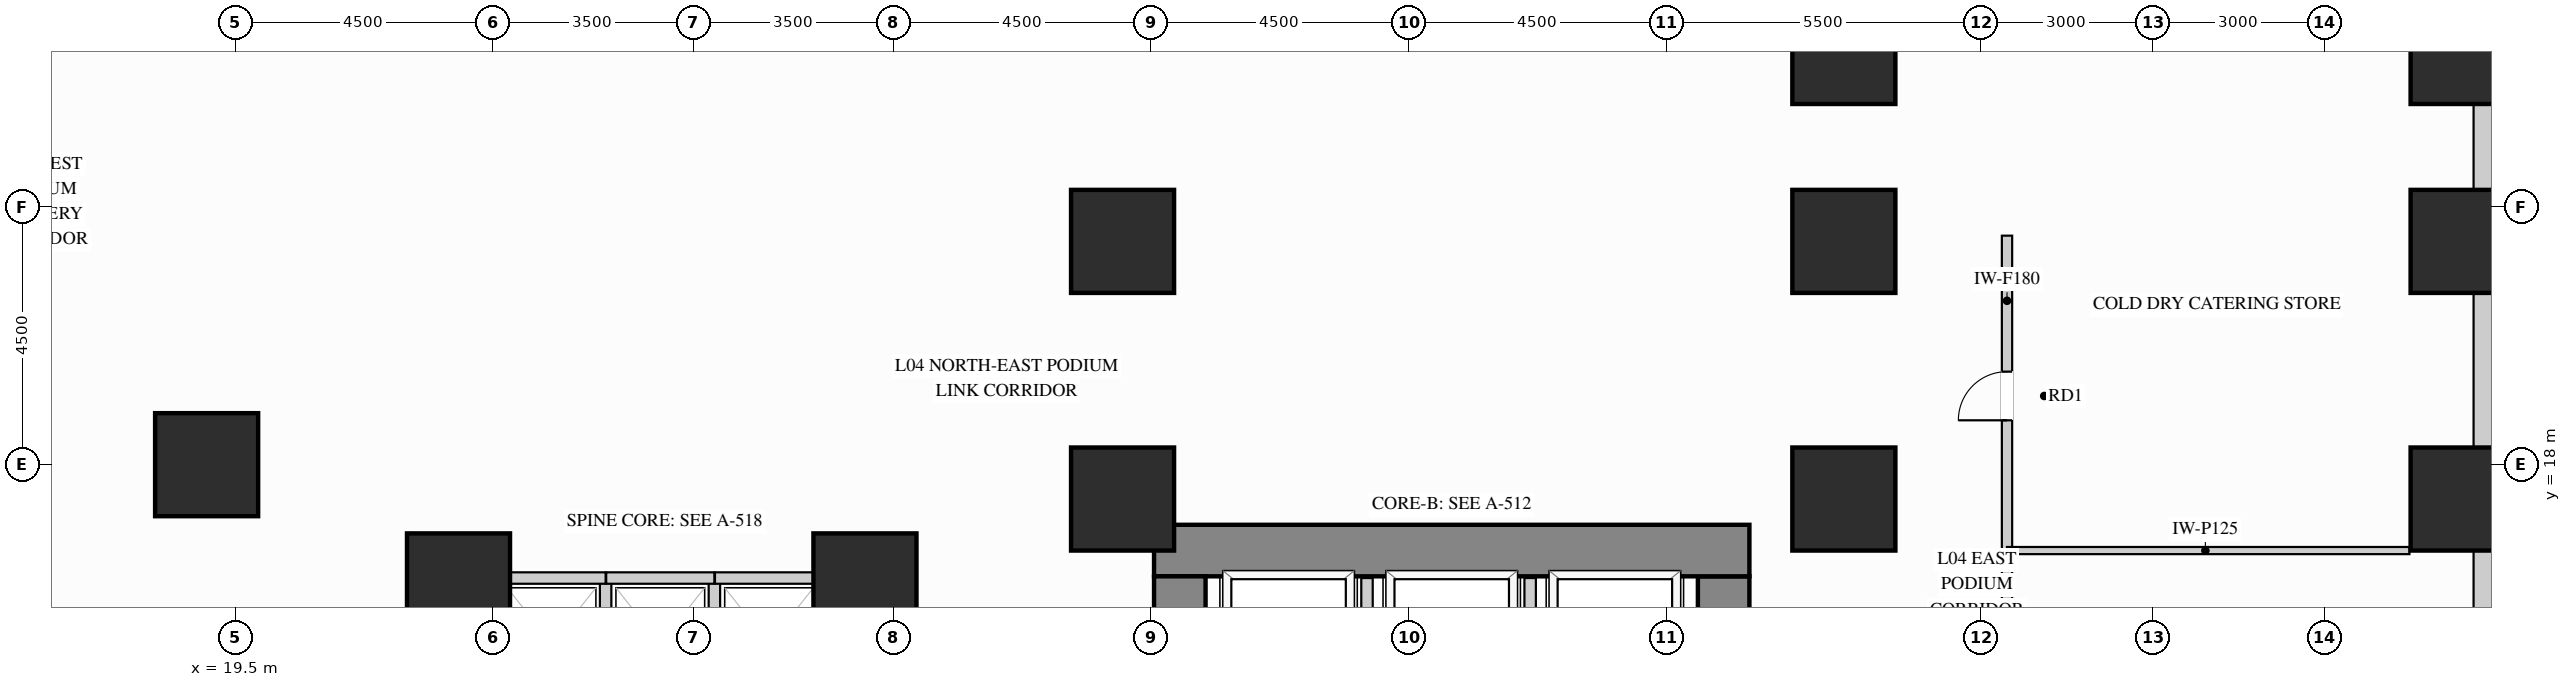
"""IFC4 building model, lengths in metres.
Left out: names, types, materials, properties, quantities, classifications, styles, units other than length and angle.
Written with IfcOpenShell. Run it as: python <this file> out.ifc"""

import sys

from ifc_helpers import new_model, si_unit, direction, frame, frame_2d, origin, origin_2d, place, context, subcontext, project, spatial, rectangle, extrude, source, transform, mapped, element, fill, save


model = new_model("IFC4")
c1 = context("Model", 3, precision=1e-05, world=origin(), true_north=direction((0.0, 1.0)))
c2 = subcontext(c1, "Body", "Model", "MODEL_VIEW")
j1 = project(units=[si_unit("LENGTHUNIT", "METRE"), si_unit("PLANEANGLEUNIT", "RADIAN")], contexts=[c1])
p1 = place(None, origin())
s1 = spatial("IfcSite", under=j1, at=p1, CompositionType="ELEMENT")
p2 = place(p1, origin())
s2 = spatial("IfcBuilding", under=s1, at=p2, CompositionType="ELEMENT")
p3 = place(p2, frame((0.0, 0.0, 18.0)))
s3 = spatial("IfcBuildingStorey", under=s2, at=p3, CompositionType="ELEMENT", Elevation=18.0)
m1 = source(origin(), c2, "Body", "SweptSolid", [
    extrude(rectangle(XDim=1.8, YDim=1.8, at=origin_2d()), origin(), (0.0, 0.0, 1.0), 4.28),
])
for number, where, z_axis, x_axis in (
    (1, (58.4, 17.4, 0.0), (0.0, 0.0, 1.0), (1.0, 0.0, 0.0)),
    (2, (58.4, 21.9, 0.0), (0.0, 0.0, 1.0), (1.0, 0.0, 0.0)),
    (3, (58.4, 25.2, 0.0), (0.0, 0.0, 1.0), (1.0, 0.0, 0.0)),
    (4, (47.6, 17.4, 0.0), (0.0, 0.0, 1.0), (1.0, 0.0, 0.0)),
    (5, (47.6, 21.9, 0.0), (0.0, 0.0, 1.0), (1.0, 0.0, 0.0)),
    (6, (47.6, 25.2, 0.0), (0.0, 0.0, 1.0), (1.0, 0.0, 0.0)),
    (7, (19.0, 18.0, 0.0), (0.0, 0.0, 1.0), (1.0, 0.0, 0.0)),
    (8, (35.0, 17.4, 0.0), (0.0, 0.0, 1.0), (1.0, 0.0, 0.0)),
    (9, (35.0, 21.9, 0.0), (0.0, 0.0, 1.0), (1.0, 0.0, 0.0)),
    (10, (23.4, 15.9, 0.0), (0.0, 0.0, 1.0), (1.0, 0.0, 0.0)),
    (11, (30.5, 15.9, 0.0), (0.0, 0.0, 1.0), (1.0, 0.0, 0.0)),
):
    element("IfcColumn", number, at=place(p3, frame(where, z_axis=z_axis, x_axis=x_axis)), inside=s3, PredefinedType="COLUMN", context=c2, shape_type="MappedRepresentation", body=[
        mapped(m1, transform((0.0, 0.0, 0.0), x_axis=(1.0, 0.0, 0.0), y_axis=(0.0, 1.0, 0.0), z_axis=(0.0, 0.0, 1.0))),
    ])
m2 = source(origin(), c2, "Body", "SweptSolid", [
    extrude(rectangle(XDim=3.65, YDim=0.9, at=frame_2d((1.825, 0.0))), origin(), (0.0, 0.0, 1.0), 4.28),
])
p4 = place(p3, frame((45.5, 12.4, 0.0), z_axis=(0.0, 0.0, 1.0), x_axis=(0.0, 1.0, 0.0)))
e12 = element("IfcWall", 12, at=p4, inside=s3, PredefinedType="SHEAR", context=c2, shape_type="MappedRepresentation", body=[
    mapped(m2, transform((0.0, 0.0, 0.0), x_axis=(1.0, 0.0, 0.0), y_axis=(0.0, 1.0, 0.0), z_axis=(0.0, 0.0, 1.0))),
])
m3 = source(origin(), c2, "Body", "SweptSolid", [
    extrude(rectangle(XDim=10.4, YDim=0.9, at=frame_2d((5.2, 0.0))), origin(), (0.0, 0.0, 1.0), 4.28),
])
p5 = place(p3, frame((35.55, 16.5, 0.0), z_axis=(0.0, 0.0, 1.0), x_axis=(1.0, 0.0, 0.0)))
e13 = element("IfcWall", 13, at=p5, inside=s3, PredefinedType="SHEAR", context=c2, shape_type="MappedRepresentation", body=[
    mapped(m3, transform((0.0, 0.0, 0.0), x_axis=(1.0, 0.0, 0.0), y_axis=(0.0, 1.0, 0.0), z_axis=(0.0, 0.0, 1.0))),
])
p6 = place(p3, frame((36.0, 12.4, 0.0), z_axis=(0.0, 0.0, 1.0), x_axis=(0.0, 1.0, 0.0)))
e14 = element("IfcWall", 14, at=p6, inside=s3, PredefinedType="SHEAR", context=c2, shape_type="MappedRepresentation", body=[
    mapped(m2, transform((0.0, 0.0, 0.0), x_axis=(1.0, 0.0, 0.0), y_axis=(0.0, 1.0, 0.0), z_axis=(0.0, 0.0, 1.0))),
])
m4 = source(origin(), c2, "Body", "SweptSolid", [
    extrude(rectangle(XDim=2.104, YDim=0.4, at=frame_2d((1.052, 0.0))), origin(), (0.0, 0.0, 1.0), 1.865),
])
p7 = place(p3, frame((58.8, 14.398, 0.0), z_axis=(0.0, 0.0, 1.0), x_axis=(0.0, 1.0, 0.0)))
e15 = element("IfcWall", 15, at=p7, inside=s3, PredefinedType="SOLIDWALL", context=c2, shape_type="MappedRepresentation", body=[
    mapped(m4, transform((0.0, 0.0, 0.0), x_axis=(1.0, 0.0, 0.0), y_axis=(0.0, 1.0, 0.0), z_axis=(0.0, 0.0, 1.0))),
])
m5 = source(origin(), c2, "Body", "SweptSolid", [
    extrude(rectangle(XDim=2.704, YDim=0.4, at=frame_2d((1.352, 0.0))), origin(), (0.0, 0.0, 1.0), 1.865),
])
p8 = place(p3, frame((58.8, 18.298, 0.0), z_axis=(0.0, 0.0, 1.0), x_axis=(0.0, 1.0, 0.0)))
e16 = element("IfcWall", 16, at=p8, inside=s3, PredefinedType="SOLIDWALL", context=c2, shape_type="MappedRepresentation", body=[
    mapped(m5, transform((0.0, 0.0, 0.0), x_axis=(1.0, 0.0, 0.0), y_axis=(0.0, 1.0, 0.0), z_axis=(0.0, 0.0, 1.0))),
])
m6 = source(origin(), c2, "Body", "SweptSolid", [
    extrude(rectangle(XDim=1.504, YDim=0.4, at=frame_2d((0.752, 0.0))), origin(), (0.0, 0.0, 1.0), 1.865),
])
p9 = place(p3, frame((58.8, 22.798, 0.0), z_axis=(0.0, 0.0, 1.0), x_axis=(0.0, 1.0, 0.0)))
e17 = element("IfcWall", 17, at=p9, inside=s3, PredefinedType="SOLIDWALL", context=c2, shape_type="MappedRepresentation", body=[
    mapped(m6, transform((0.0, 0.0, 0.0), x_axis=(1.0, 0.0, 0.0), y_axis=(0.0, 1.0, 0.0), z_axis=(0.0, 0.0, 1.0))),
])
p10 = place(p3, frame((50.45, 8.5, 0.0), z_axis=(0.0, 0.0, 1.0), x_axis=(0.0, 1.0, 0.0)))
e18 = element("IfcWall", 18, at=p10, inside=s3, PredefinedType="PARTITIONING", context=c2, shape_type="SweptSolid", body=[
    extrude(rectangle(XDim=8.0, YDim=0.18, at=frame_2d((4.0, 0.0))), origin(), (0.0, 0.0, 1.0), 4.265),
])
p11 = place(p10, frame((3.525, 0.0, 0.0)))
e19 = element("IfcOpeningElement", 19, at=p11, cuts=e18, PredefinedType="OPENING", context=c2, shape_type="SweptSolid", body=[
    extrude(rectangle(XDim=0.95, YDim=2.15, at=frame_2d((0.475, 1.075))), frame((0.0, 0.1, 0.0), z_axis=(0.0, -1.0, 0.0), x_axis=(1.0, 0.0, 0.0)), (0.0, 0.0, 1.0), 0.2),
])
p12 = place(p3, frame((50.45, 16.5, 0.0), z_axis=(0.0, 0.0, 1.0), x_axis=(0.0, 1.0, 0.0)))
e20 = element("IfcWall", 20, at=p12, inside=s3, PredefinedType="PARTITIONING", context=c2, shape_type="SweptSolid", body=[
    extrude(rectangle(XDim=5.5, YDim=0.18, at=frame_2d((2.75, 0.0))), origin(), (0.0, 0.0, 1.0), 4.265),
])
p13 = place(p12, frame((2.275, 0.0, 0.0)))
e21 = element("IfcOpeningElement", 21, at=p13, cuts=e20, PredefinedType="OPENING", context=c2, shape_type="SweptSolid", body=[
    extrude(rectangle(XDim=0.85, YDim=2.1, at=frame_2d((0.425, 1.05))), frame((0.0, 0.1, 0.0), z_axis=(0.0, -1.0, 0.0), x_axis=(1.0, 0.0, 0.0)), (0.0, 0.0, 1.0), 0.2),
])
m7 = source(origin(), c2, "Body", "SweptSolid", [
    extrude(rectangle(XDim=7.03, YDim=0.125, at=frame_2d((3.515, 0.0))), origin(), (0.0, 0.0, 1.0), 4.265),
])
p14 = place(p3, frame((50.45, 16.5, 0.0), z_axis=(0.0, 0.0, 1.0), x_axis=(1.0, 0.0, 0.0)))
e22 = element("IfcWall", 22, at=p14, inside=s3, PredefinedType="PARTITIONING", context=c2, shape_type="MappedRepresentation", body=[
    mapped(m7, transform((0.0, 0.0, 0.0), x_axis=(1.0, 0.0, 0.0), y_axis=(0.0, 1.0, 0.0), z_axis=(0.0, 0.0, 1.0))),
])
m8 = source(origin(), c2, "Body", "SweptSolid", [
    extrude(rectangle(XDim=1.89, YDim=0.2, at=frame_2d((0.945, 0.0))), origin(), (0.0, 0.0, 1.0), 4.265),
])
for number, where, z_axis, x_axis in (
    (23, (39.27, 14.13, 0.0), (0.0, 0.0, 1.0), (0.0, 1.0, 0.0)),
    (24, (42.12, 14.13, 0.0), (0.0, 0.0, 1.0), (0.0, 1.0, 0.0)),
):
    element("IfcWall", number, at=place(p3, frame(where, z_axis=z_axis, x_axis=x_axis)), inside=s3, PredefinedType="PARTITIONING", context=c2, shape_type="MappedRepresentation", body=[
        mapped(m8, transform((0.0, 0.0, 0.0), x_axis=(1.0, 0.0, 0.0), y_axis=(0.0, 1.0, 0.0), z_axis=(0.0, 0.0, 1.0))),
    ])
m9 = source(origin(), c2, "Body", "SweptSolid", [
    extrude(rectangle(XDim=2.29, YDim=0.2, at=frame_2d((1.145, 0.0))), origin(), (0.0, 0.0, 1.0), 4.265),
])
p15 = place(p3, frame((25.97, 13.73, 0.0), z_axis=(0.0, 0.0, 1.0), x_axis=(0.0, 1.0, 0.0)))
e25 = element("IfcWall", 25, at=p15, inside=s3, PredefinedType="PARTITIONING", context=c2, shape_type="MappedRepresentation", body=[
    mapped(m9, transform((0.0, 0.0, 0.0), x_axis=(1.0, 0.0, 0.0), y_axis=(0.0, 1.0, 0.0), z_axis=(0.0, 0.0, 1.0))),
])
m10 = source(origin(), c2, "Body", "SweptSolid", [
    extrude(rectangle(XDim=1.89, YDim=0.2, at=frame_2d((0.945, 0.0))), origin(), (0.0, 0.0, 1.0), 4.265),
])
p16 = place(p3, frame((24.08, 16.02, 0.0), z_axis=(0.0, 0.0, 1.0), x_axis=(1.0, 0.0, 0.0)))
e26 = element("IfcWall", 26, at=p16, inside=s3, PredefinedType="PARTITIONING", context=c2, shape_type="MappedRepresentation", body=[
    mapped(m10, transform((0.0, 0.0, 0.0), x_axis=(1.0, 0.0, 0.0), y_axis=(0.0, 1.0, 0.0), z_axis=(0.0, 0.0, 1.0))),
])
for number, where, z_axis, x_axis in (
    (27, (24.08, 13.73, 0.0), (0.0, 0.0, 1.0), (0.0, 1.0, 0.0)),
    (28, (27.87, 13.73, 0.0), (0.0, 0.0, 1.0), (0.0, 1.0, 0.0)),
):
    element("IfcWall", number, at=place(p3, frame(where, z_axis=z_axis, x_axis=x_axis)), inside=s3, PredefinedType="PARTITIONING", context=c2, shape_type="MappedRepresentation", body=[
        mapped(m9, transform((0.0, 0.0, 0.0), x_axis=(1.0, 0.0, 0.0), y_axis=(0.0, 1.0, 0.0), z_axis=(0.0, 0.0, 1.0))),
    ])
p17 = place(p3, frame((25.98, 16.02, 0.0), z_axis=(0.0, 0.0, 1.0), x_axis=(1.0, 0.0, 0.0)))
e29 = element("IfcWall", 29, at=p17, inside=s3, PredefinedType="PARTITIONING", context=c2, shape_type="MappedRepresentation", body=[
    mapped(m8, transform((0.0, 0.0, 0.0), x_axis=(1.0, 0.0, 0.0), y_axis=(0.0, 1.0, 0.0), z_axis=(0.0, 0.0, 1.0))),
])
p18 = place(p3, frame((29.77, 13.73, 0.0), z_axis=(0.0, 0.0, 1.0), x_axis=(0.0, 1.0, 0.0)))
e30 = element("IfcWall", 30, at=p18, inside=s3, PredefinedType="PARTITIONING", context=c2, shape_type="MappedRepresentation", body=[
    mapped(m9, transform((0.0, 0.0, 0.0), x_axis=(1.0, 0.0, 0.0), y_axis=(0.0, 1.0, 0.0), z_axis=(0.0, 0.0, 1.0))),
])
p19 = place(p3, frame((27.88, 16.02, 0.0), z_axis=(0.0, 0.0, 1.0), x_axis=(1.0, 0.0, 0.0)))
e31 = element("IfcWall", 31, at=p19, inside=s3, PredefinedType="PARTITIONING", context=c2, shape_type="MappedRepresentation", body=[
    mapped(m8, transform((0.0, 0.0, 0.0), x_axis=(1.0, 0.0, 0.0), y_axis=(0.0, 1.0, 0.0), z_axis=(0.0, 0.0, 1.0))),
])
m11 = source(origin(), c2, "Body", "SweptSolid", [
    extrude(rectangle(XDim=0.85, YDim=2.1, at=frame_2d((0.425, 1.05))), frame((0.0, 0.025, 0.0), z_axis=(0.0, -1.0, 0.0), x_axis=(1.0, 0.0, 0.0)), (0.0, 0.0, 1.0), 0.05),
])
p20 = place(p13, origin())
e32 = element("IfcDoor", 32, at=p20, inside=s3, OperationType="SINGLE_SWING_LEFT", PredefinedType="DOOR", context=c2, shape_type="MappedRepresentation", body=[
    mapped(m11, transform((0.0, 0.0, 0.0), x_axis=(1.0, 0.0, 0.0), y_axis=(0.0, 1.0, 0.0), z_axis=(0.0, 0.0, 1.0))),
])
fill(e21, e32)
save(model, sys.argv[1])
